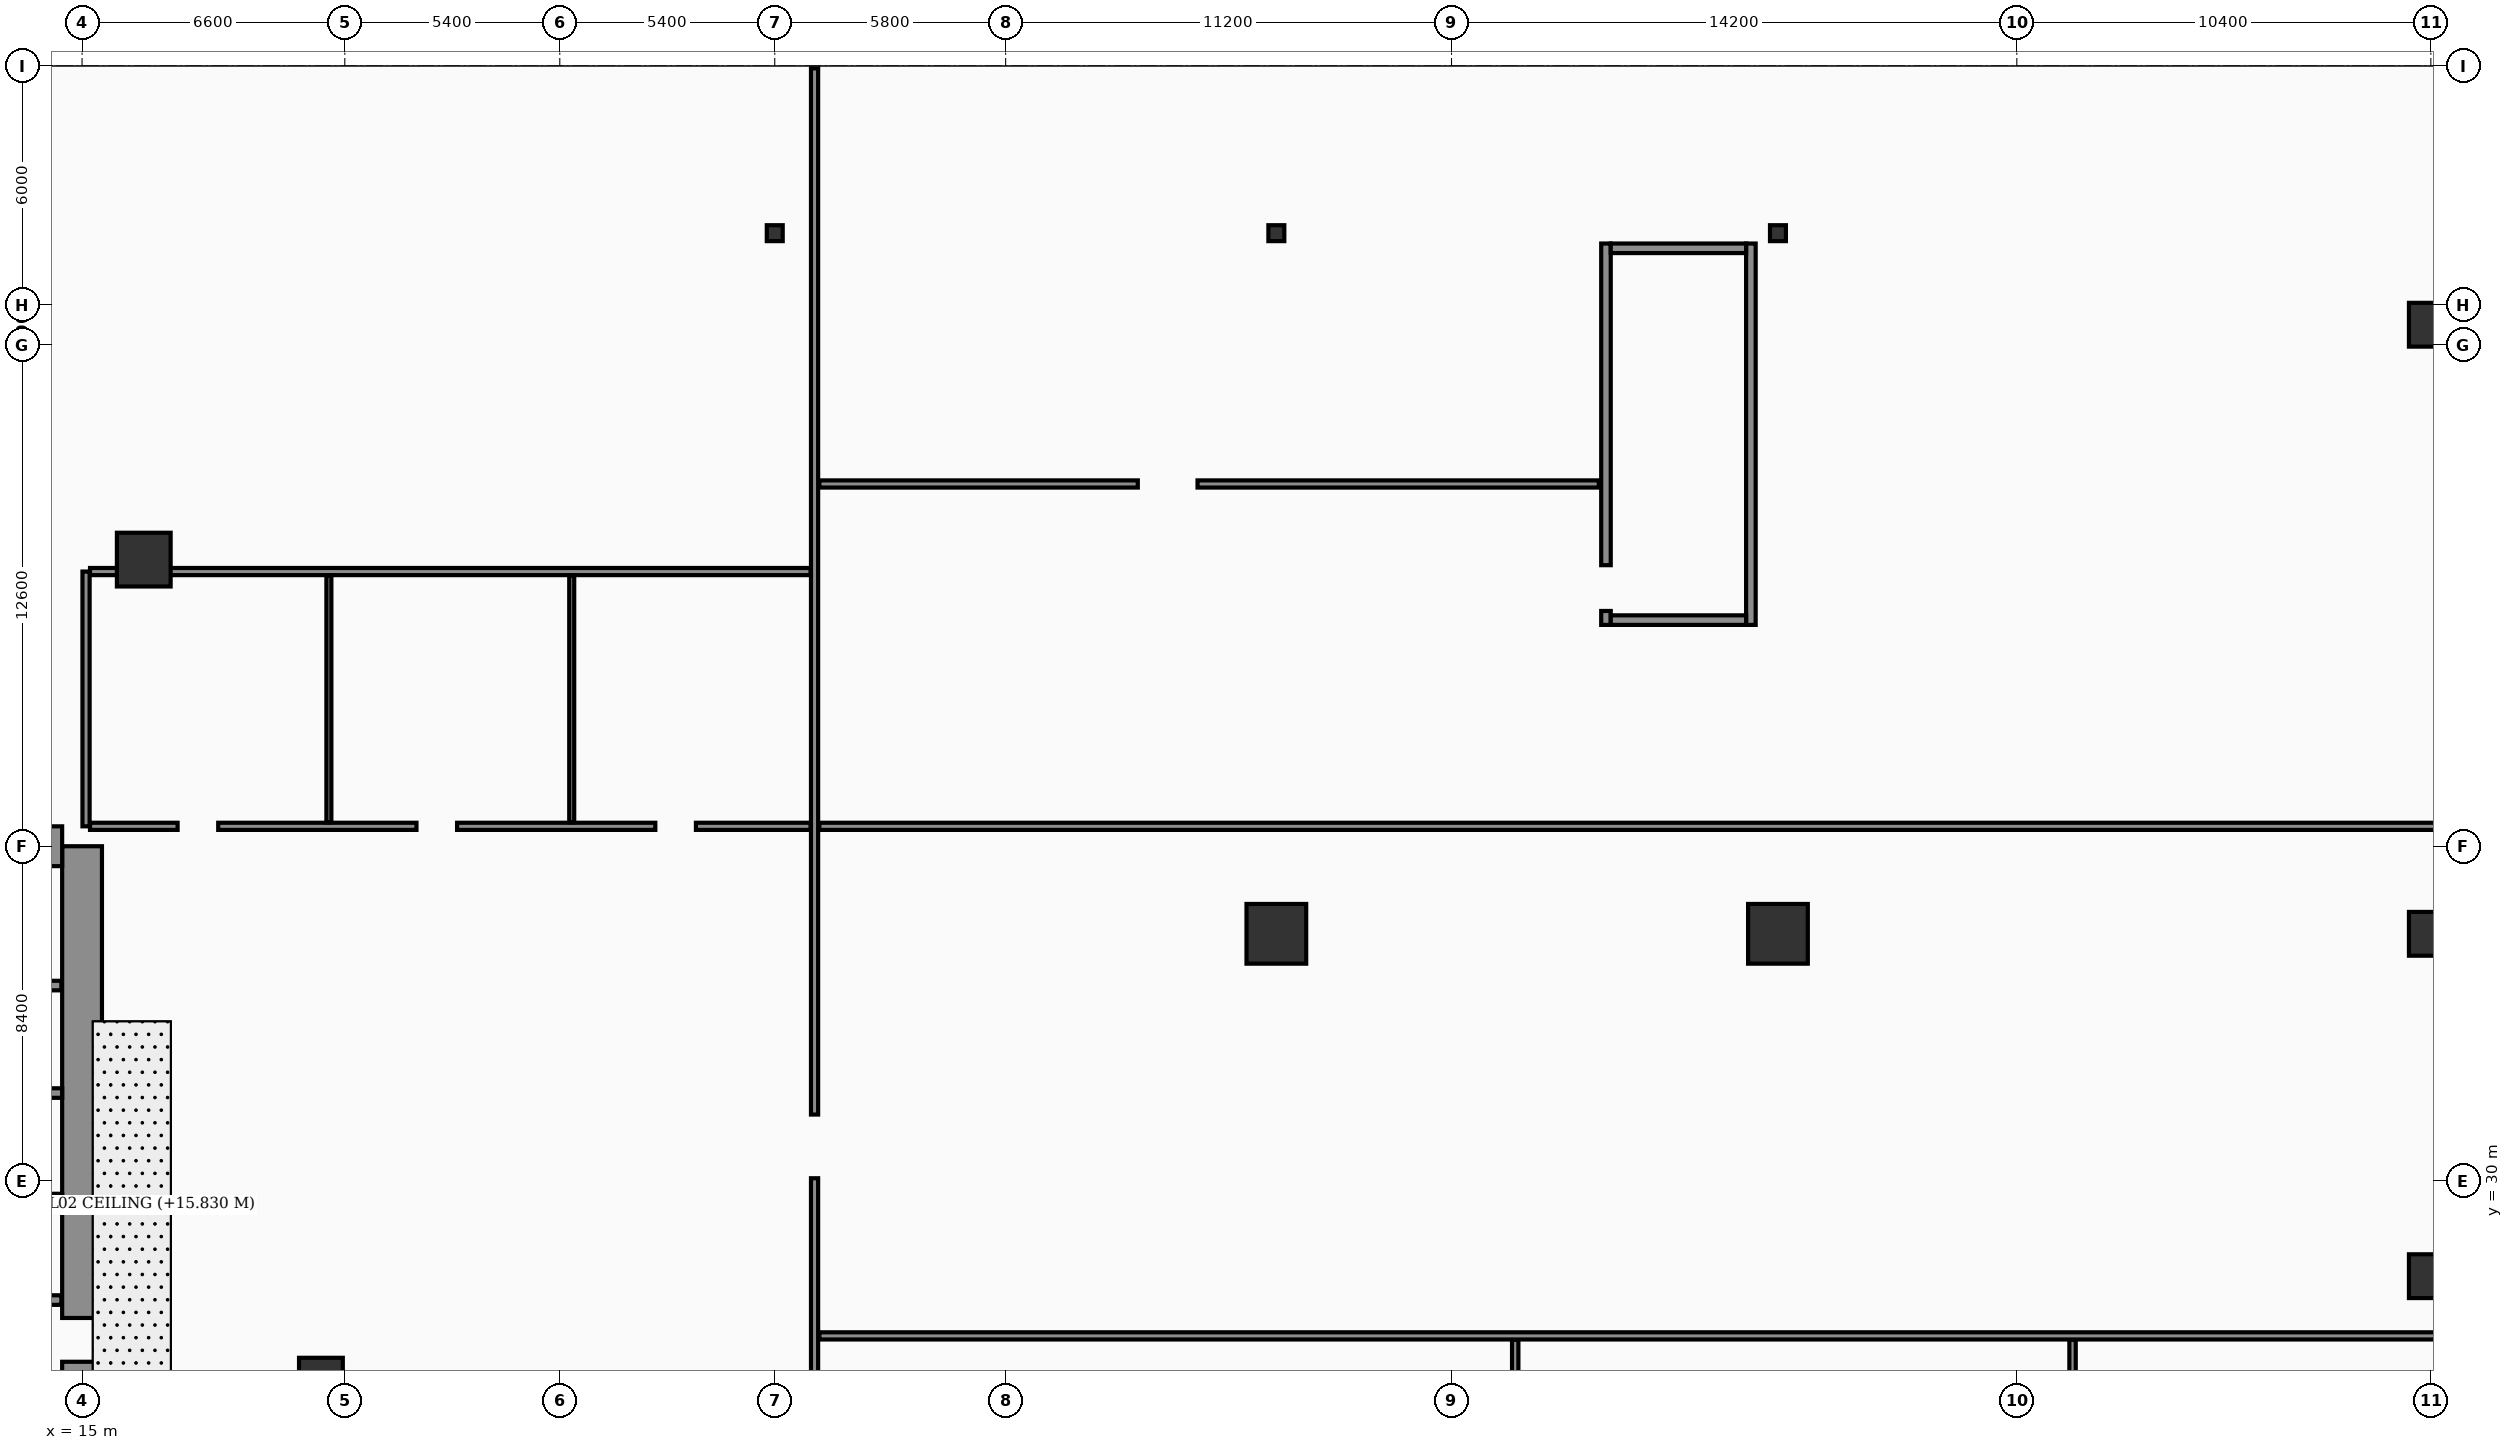
"""IFC4 building model, lengths in metres.
Left out: names, types, materials, properties, quantities, classifications, styles, units other than length and angle.
Written with IfcOpenShell. Run it as: python <this file> out.ifc"""

import sys

from ifc_helpers import new_model, si_unit, direction, frame, frame_2d, origin, origin_2d, place, context, subcontext, project, spatial, rectangle, hollow_rectangle, i_section, extrude, element, fill, save


model = new_model("IFC4")
c1 = context("Model", 3, precision=1e-05, world=origin(), true_north=direction((0.0, 1.0)))
c2 = subcontext(c1, "Body", "Model", "MODEL_VIEW")
j1 = project(units=[si_unit("LENGTHUNIT", "METRE"), si_unit("PLANEANGLEUNIT", "RADIAN")], contexts=[c1])
p1 = place(None, origin())
s1 = spatial("IfcSite", under=j1, at=p1, CompositionType="ELEMENT")
p2 = place(p1, origin())
s2 = spatial("IfcBuilding", under=s1, at=p2, CompositionType="ELEMENT")
p3 = place(p2, frame((0.0, 0.0, 12.0)))
s3 = spatial("IfcBuildingStorey", under=s2, at=p3, CompositionType="ELEMENT", Elevation=12.0)
p4 = place(p3, frame((15.0, 16.8, 0.0), z_axis=(0.0, 0.0, 1.0), x_axis=(0.0, 1.0, 0.0)))
e1 = element("IfcWall", 1, at=p4, inside=s3, PredefinedType="SHEAR", context=c2, shape_type="SweptSolid", body=[
    extrude(rectangle(XDim=21.6, YDim=1.0, at=frame_2d((10.8, 0.0))), origin(), (0.0, 0.0, 1.0), 4.68),
])
p5 = place(p4, frame((8.65, 0.0, 0.0)))
e2 = element("IfcOpeningElement", 2, at=p5, cuts=e1, PredefinedType="OPENING", context=c2, shape_type="SweptSolid", body=[
    extrude(rectangle(XDim=1.1, YDim=2.2, at=frame_2d((0.55, 1.1))), frame((0.0, 0.51, 0.0), z_axis=(0.0, -1.0, 0.0), x_axis=(1.0, 0.0, 0.0)), (0.0, 0.0, 1.0), 1.02),
])
p6 = place(p4, frame((1.25, 0.0, 0.0)))
e3 = element("IfcOpeningElement", 3, at=p6, cuts=e1, PredefinedType="OPENING", context=c2, shape_type="SweptSolid", body=[
    extrude(rectangle(XDim=1.1, YDim=2.2, at=frame_2d((0.55, 1.1))), frame((0.0, 0.51, 0.0), z_axis=(0.0, -1.0, 0.0), x_axis=(1.0, 0.0, 0.0)), (0.0, 0.0, 1.0), 1.02),
])
p7 = place(p4, frame((3.8, 0.0, 0.0)))
e4 = element("IfcOpeningElement", 4, at=p7, cuts=e1, PredefinedType="OPENING", context=c2, shape_type="SweptSolid", body=[
    extrude(rectangle(XDim=1.1, YDim=2.2, at=frame_2d((0.55, 1.1))), frame((0.0, 0.51, 0.0), z_axis=(0.0, -1.0, 0.0), x_axis=(1.0, 0.0, 0.0)), (0.0, 0.0, 1.0), 1.02),
])
p8 = place(p4, frame((6.35, 0.0, 0.0)))
e5 = element("IfcOpeningElement", 5, at=p8, cuts=e1, PredefinedType="OPENING", context=c2, shape_type="SweptSolid", body=[
    extrude(rectangle(XDim=1.1, YDim=2.2, at=frame_2d((0.55, 1.1))), frame((0.0, 0.51, 0.0), z_axis=(0.0, -1.0, 0.0), x_axis=(1.0, 0.0, 0.0)), (0.0, 0.0, 1.0), 1.02),
])
p9 = place(p3, frame((4.7, 38.4, 0.0), z_axis=(0.0, 0.0, 1.0), x_axis=(1.0, 0.0, 0.0)))
e6 = element("IfcWall", 6, at=p9, inside=s3, PredefinedType="SHEAR", context=c2, shape_type="SweptSolid", body=[
    extrude(rectangle(XDim=9.8, YDim=1.0, at=frame_2d((4.9, 0.0))), origin(), (0.0, 0.0, 1.0), 4.68),
])
p10 = place(p3, frame((53.28, 43.96, 0.0), z_axis=(0.0, 0.0, 1.0), x_axis=(0.0, 1.0, 0.0)))
e7 = element("IfcWall", 7, at=p10, inside=s3, PredefinedType="SOLIDWALL", context=c2, shape_type="SweptSolid", body=[
    extrude(rectangle(XDim=9.58, YDim=0.24, at=frame_2d((4.79, 0.0))), origin(), (0.0, 0.0, 1.0), 4.68),
])
p11 = place(p10, frame((0.35, 0.0, 0.0)))
e8 = element("IfcOpeningElement", 8, at=p11, cuts=e7, PredefinedType="OPENING", context=c2, shape_type="SweptSolid", body=[
    extrude(rectangle(XDim=1.15, YDim=2.2, at=frame_2d((0.575, 1.1))), frame((0.0, 0.13, 0.0), z_axis=(0.0, -1.0, 0.0), x_axis=(1.0, 0.0, 0.0)), (0.0, 0.0, 1.0), 0.26),
])
p12 = place(p3, frame((56.92, 43.96, 0.0), z_axis=(0.0, 0.0, 1.0), x_axis=(0.0, 1.0, 0.0)))
e9 = element("IfcWall", 9, at=p12, inside=s3, PredefinedType="SOLIDWALL", context=c2, shape_type="SweptSolid", body=[
    extrude(rectangle(XDim=9.58, YDim=0.24, at=frame_2d((4.79, 0.0))), origin(), (0.0, 0.0, 1.0), 4.68),
])
for number, where, z_axis, x_axis in (
    (10, (53.4, 44.08, 0.0), (0.0, 0.0, 1.0), (1.0, 0.0, 0.0)),
    (11, (53.4, 53.42, 0.0), (0.0, 0.0, 1.0), (1.0, 0.0, 0.0)),
):
    element("IfcWall", number, at=place(p3, frame(where, z_axis=z_axis, x_axis=x_axis)), inside=s3, PredefinedType="SOLIDWALL", context=c2, shape_type="SweptSolid", body=[
        extrude(rectangle(XDim=3.4, YDim=0.24, at=frame_2d((1.7, 0.0))), origin(), (0.0, 0.0, 1.0), 4.68),
    ])
for number, where, z_axis, x_axis in (
    (12, (12.18, 29.55, 0.0), (0.0, 0.0, 1.0), (1.0, 0.0, 0.0)),
    (13, (12.18, 32.2, 0.0), (0.0, 0.0, 1.0), (1.0, 0.0, 0.0)),
):
    element("IfcWall", number, at=place(p3, frame(where, z_axis=z_axis, x_axis=x_axis)), inside=s3, PredefinedType="SOLIDWALL", context=c2, shape_type="SweptSolid", body=[
        extrude(rectangle(XDim=2.32, YDim=0.24, at=frame_2d((1.16, 0.0))), origin(), (0.0, 0.0, 1.0), 4.68),
    ])
p13 = place(p3, frame((16.55, 45.6, 0.0), z_axis=(0.0, 0.0, 1.0), x_axis=(1.0, 0.0, 0.0)))
e14 = element("IfcColumn", 14, at=p13, inside=s3, PredefinedType="COLUMN", context=c2, shape_type="SweptSolid", body=[
    extrude(rectangle(XDim=1.35, YDim=1.35, at=origin_2d()), origin(), (0.0, 0.0, 1.0), 4.68),
])
for number, where, z_axis, x_axis in (
    (15, (21.0, 25.0, 0.0), (0.0, 0.0, 1.0), (1.0, 0.0, 0.0)),
    (16, (74.0, 27.6, 0.0), (0.0, 0.0, 1.0), (1.0, 0.0, 0.0)),
    (17, (74.0, 36.2, 0.0), (0.0, 0.0, 1.0), (1.0, 0.0, 0.0)),
    (18, (74.0, 51.5, 0.0), (0.0, 0.0, 1.0), (1.0, 0.0, 0.0)),
):
    element("IfcColumn", number, at=place(p3, frame(where, z_axis=z_axis, x_axis=x_axis)), inside=s3, PredefinedType="COLUMN", context=c2, shape_type="SweptSolid", body=[
        extrude(hollow_rectangle(XDim=1.1, YDim=1.1, WallThickness=0.045, at=origin_2d()), origin(), (0.0, 0.0, 1.0), 4.68),
    ])
for number, where, z_axis, x_axis in (
    (19, (45.0, 36.2, 0.0), (0.0, 0.0, 1.0), (1.0, 0.0, 0.0)),
    (20, (57.6, 36.2, 0.0), (0.0, 0.0, 1.0), (1.0, 0.0, 0.0)),
):
    element("IfcColumn", number, at=place(p3, frame(where, z_axis=z_axis, x_axis=x_axis)), inside=s3, PredefinedType="COLUMN", context=c2, shape_type="SweptSolid", body=[
        extrude(rectangle(XDim=1.5, YDim=1.5, at=origin_2d()), origin(), (0.0, 0.0, 1.0), 4.68),
    ])
for number, where, z_axis, x_axis in (
    (21, (32.4, 53.8, 0.0), (0.0, 0.0, 1.0), (1.0, 0.0, 0.0)),
    (22, (45.0, 53.8, 0.0), (0.0, 0.0, 1.0), (1.0, 0.0, 0.0)),
    (23, (57.6, 53.8, 0.0), (0.0, 0.0, 1.0), (1.0, 0.0, 0.0)),
):
    element("IfcColumn", number, at=place(p3, frame(where, z_axis=z_axis, x_axis=x_axis)), inside=s3, PredefinedType="PILASTER", context=c2, shape_type="SweptSolid", body=[
        extrude(i_section(OverallWidth=0.4, OverallDepth=0.4, WebThickness=0.013, FlangeThickness=0.021, FilletRadius=0.022, at=origin_2d()), origin(), (0.0, 0.0, 1.0), 4.68),
    ])
p14 = place(p3, frame((12.25, 27.0, 0.0), z_axis=(0.0, 0.0, 1.0), x_axis=(1.0, 0.0, 0.0)))
e24 = element("IfcWall", 24, at=p14, inside=s3, PredefinedType="SOLIDWALL", context=c2, shape_type="SweptSolid", body=[
    extrude(rectangle(XDim=2.23, YDim=0.24, at=frame_2d((1.115, 0.0))), origin(), (0.0, 0.0, 1.0), 4.68),
])
p15 = place(p3, frame((9.66, 34.9, 0.0), z_axis=(0.0, 0.0, 1.0), x_axis=(1.0, 0.0, 0.0)))
e25 = element("IfcWall", 25, at=p15, inside=s3, PredefinedType="SOLIDWALL", context=c2, shape_type="SweptSolid", body=[
    extrude(rectangle(XDim=4.82, YDim=0.24, at=frame_2d((2.41, 0.0))), origin(), (0.0, 0.0, 1.0), 4.68),
])
p16 = place(p3, frame((15.2, 38.9, 0.0), z_axis=(0.0, 0.0, 1.0), x_axis=(1.0, 0.0, 0.0)))
e26 = element("IfcWall", 26, at=p16, inside=s3, PredefinedType="PARTITIONING", context=c2, shape_type="SweptSolid", body=[
    extrude(rectangle(XDim=18.1, YDim=0.18, at=frame_2d((9.05, 0.0))), origin(), (0.0, 0.0, 1.0), 3.88),
])
p17 = place(p16, frame((2.2, 0.0, 0.0)))
e27 = element("IfcOpeningElement", 27, at=p17, cuts=e26, PredefinedType="OPENING", context=c2, shape_type="SweptSolid", body=[
    extrude(rectangle(XDim=1.02, YDim=2.2, at=frame_2d((0.51, 1.1))), frame((0.0, 0.1, 0.0), z_axis=(0.0, -1.0, 0.0), x_axis=(1.0, 0.0, 0.0)), (0.0, 0.0, 1.0), 0.2),
])
p18 = place(p16, frame((8.2, 0.0, 0.0)))
e28 = element("IfcOpeningElement", 28, at=p18, cuts=e26, PredefinedType="OPENING", context=c2, shape_type="SweptSolid", body=[
    extrude(rectangle(XDim=1.02, YDim=2.2, at=frame_2d((0.51, 1.1))), frame((0.0, 0.1, 0.0), z_axis=(0.0, -1.0, 0.0), x_axis=(1.0, 0.0, 0.0)), (0.0, 0.0, 1.0), 0.2),
])
p19 = place(p16, frame((14.2, 0.0, 0.0)))
e29 = element("IfcOpeningElement", 29, at=p19, cuts=e26, PredefinedType="OPENING", context=c2, shape_type="SweptSolid", body=[
    extrude(rectangle(XDim=1.02, YDim=2.2, at=frame_2d((0.51, 1.1))), frame((0.0, 0.1, 0.0), z_axis=(0.0, -1.0, 0.0), x_axis=(1.0, 0.0, 0.0)), (0.0, 0.0, 1.0), 0.2),
])
p20 = place(p3, frame((15.2, 45.3, 0.0), z_axis=(0.0, 0.0, 1.0), x_axis=(1.0, 0.0, 0.0)))
e30 = element("IfcWall", 30, at=p20, inside=s3, PredefinedType="PARTITIONING", context=c2, shape_type="SweptSolid", body=[
    extrude(rectangle(XDim=18.1, YDim=0.18, at=frame_2d((9.05, 0.0))), origin(), (0.0, 0.0, 1.0), 3.88),
])
p21 = place(p3, frame((15.1, 38.9, 0.0), z_axis=(0.0, 0.0, 1.0), x_axis=(0.0, 1.0, 0.0)))
e31 = element("IfcWall", 31, at=p21, inside=s3, PredefinedType="PARTITIONING", context=c2, shape_type="SweptSolid", body=[
    extrude(rectangle(XDim=6.4, YDim=0.18, at=frame_2d((3.2, 0.0))), origin(), (0.0, 0.0, 1.0), 3.88),
])
p22 = place(p3, frame((21.2, 39.0, 0.0), z_axis=(0.0, 0.0, 1.0), x_axis=(0.0, 1.0, 0.0)))
e32 = element("IfcWall", 32, at=p22, inside=s3, PredefinedType="PARTITIONING", context=c2, shape_type="SweptSolid", body=[
    extrude(rectangle(XDim=6.2, YDim=0.125, at=frame_2d((3.1, 0.0))), origin(), (0.0, 0.0, 1.0), 3.88),
])
p23 = place(p3, frame((27.3, 39.0, 0.0), z_axis=(0.0, 0.0, 1.0), x_axis=(0.0, 1.0, 0.0)))
e33 = element("IfcWall", 33, at=p23, inside=s3, PredefinedType="PARTITIONING", context=c2, shape_type="SweptSolid", body=[
    extrude(rectangle(XDim=6.2, YDim=0.125, at=frame_2d((3.1, 0.0))), origin(), (0.0, 0.0, 1.0), 4.68),
])
p24 = place(p3, frame((33.4, 0.06, 0.0), z_axis=(0.0, 0.0, 1.0), x_axis=(0.0, 1.0, 0.0)))
e34 = element("IfcWall", 34, at=p24, inside=s3, PredefinedType="PARTITIONING", context=c2, shape_type="SweptSolid", body=[
    extrude(rectangle(XDim=57.88, YDim=0.18, at=frame_2d((28.94, 0.0))), origin(), (0.0, 0.0, 1.0), 3.88),
])
p25 = place(p24, frame((16.5, 0.0, 0.0)))
e35 = element("IfcOpeningElement", 35, at=p25, cuts=e34, PredefinedType="OPENING", context=c2, shape_type="SweptSolid", body=[
    extrude(rectangle(XDim=1.5, YDim=2.22, at=frame_2d((0.75, 1.11))), frame((0.0, 0.1, 0.0), z_axis=(0.0, -1.0, 0.0), x_axis=(1.0, 0.0, 0.0)), (0.0, 0.0, 1.0), 0.2),
])
p26 = place(p24, frame((30.0, 0.0, 0.0)))
e36 = element("IfcOpeningElement", 36, at=p26, cuts=e34, PredefinedType="OPENING", context=c2, shape_type="SweptSolid", body=[
    extrude(rectangle(XDim=1.6, YDim=2.35, at=frame_2d((0.8, 1.175))), frame((0.0, 0.1, 0.0), z_axis=(0.0, -1.0, 0.0), x_axis=(1.0, 0.0, 0.0)), (0.0, 0.0, 1.0), 0.2),
])
p27 = place(p3, frame((51.0, 0.06, 0.0), z_axis=(0.0, 0.0, 1.0), x_axis=(0.0, 1.0, 0.0)))
e37 = element("IfcWall", 37, at=p27, inside=s3, PredefinedType="PARTITIONING", context=c2, shape_type="SweptSolid", body=[
    extrude(rectangle(XDim=25.94, YDim=0.16, at=frame_2d((12.97, 0.0))), origin(), (0.0, 0.0, 1.0), 4.18),
])
p28 = place(p27, frame((10.0, 0.0, 0.0)))
e38 = element("IfcOpeningElement", 38, at=p28, cuts=e37, PredefinedType="OPENING", context=c2, shape_type="SweptSolid", body=[
    extrude(rectangle(XDim=1.5, YDim=2.22, at=frame_2d((0.75, 1.11))), frame((0.0, 0.09, 0.0), z_axis=(0.0, -1.0, 0.0), x_axis=(1.0, 0.0, 0.0)), (0.0, 0.0, 1.0), 0.18),
])
p29 = place(p3, frame((65.0, 0.06, 0.0), z_axis=(0.0, 0.0, 1.0), x_axis=(0.0, 1.0, 0.0)))
e39 = element("IfcWall", 39, at=p29, inside=s3, PredefinedType="PARTITIONING", context=c2, shape_type="SweptSolid", body=[
    extrude(rectangle(XDim=25.94, YDim=0.16, at=frame_2d((12.97, 0.0))), origin(), (0.0, 0.0, 1.0), 4.18),
])
p30 = place(p29, frame((10.0, 0.0, 0.0)))
e40 = element("IfcOpeningElement", 40, at=p30, cuts=e39, PredefinedType="OPENING", context=c2, shape_type="SweptSolid", body=[
    extrude(rectangle(XDim=1.6, YDim=2.35, at=frame_2d((0.8, 1.175))), frame((0.0, 0.09, 0.0), z_axis=(0.0, -1.0, 0.0), x_axis=(1.0, 0.0, 0.0)), (0.0, 0.0, 1.0), 0.18),
])
p31 = place(p3, frame((33.52, 26.1, 0.0), z_axis=(0.0, 0.0, 1.0), x_axis=(1.0, 0.0, 0.0)))
e41 = element("IfcWall", 41, at=p31, inside=s3, PredefinedType="PARTITIONING", context=c2, shape_type="SweptSolid", body=[
    extrude(rectangle(XDim=50.42, YDim=0.18, at=frame_2d((25.21, 0.0))), origin(), (0.0, 0.0, 1.0), 3.18),
])
p32 = place(p3, frame((33.52, 38.9, 0.0), z_axis=(0.0, 0.0, 1.0), x_axis=(1.0, 0.0, 0.0)))
e42 = element("IfcWall", 42, at=p32, inside=s3, PredefinedType="PARTITIONING", context=c2, shape_type="SweptSolid", body=[
    extrude(rectangle(XDim=50.42, YDim=0.18, at=frame_2d((25.21, 0.0))), origin(), (0.0, 0.0, 1.0), 3.88),
])
p33 = place(p3, frame((33.52, 47.5, 0.0), z_axis=(0.0, 0.0, 1.0), x_axis=(1.0, 0.0, 0.0)))
e43 = element("IfcWall", 43, at=p33, inside=s3, PredefinedType="PARTITIONING", context=c2, shape_type="SweptSolid", body=[
    extrude(rectangle(XDim=19.58, YDim=0.18, at=frame_2d((9.79, 0.0))), origin(), (0.0, 0.0, 1.0), 3.88),
])
p34 = place(p33, frame((8.0, 0.0, 0.0)))
e44 = element("IfcOpeningElement", 44, at=p34, cuts=e43, PredefinedType="OPENING", context=c2, shape_type="SweptSolid", body=[
    extrude(rectangle(XDim=1.5, YDim=2.22, at=frame_2d((0.75, 1.11))), frame((0.0, 0.1, 0.0), z_axis=(0.0, -1.0, 0.0), x_axis=(1.0, 0.0, 0.0)), (0.0, 0.0, 1.0), 0.2),
])
p35 = place(p17, origin())
e45 = element("IfcDoor", 45, at=p35, inside=s3, OperationType="SINGLE_SWING_LEFT", PredefinedType="DOOR", context=c2, shape_type="SweptSolid", body=[
    extrude(rectangle(XDim=1.02, YDim=2.2, at=frame_2d((0.51, 1.1))), frame((0.0, 0.025, 0.0), z_axis=(0.0, -1.0, 0.0), x_axis=(1.0, 0.0, 0.0)), (0.0, 0.0, 1.0), 0.05),
])
fill(e27, e45)
p36 = place(p18, origin())
e46 = element("IfcDoor", 46, at=p36, inside=s3, OperationType="SINGLE_SWING_RIGHT", PredefinedType="DOOR", context=c2, shape_type="SweptSolid", body=[
    extrude(rectangle(XDim=1.02, YDim=2.2, at=frame_2d((0.51, 1.1))), frame((0.0, 0.025, 0.0), z_axis=(0.0, -1.0, 0.0), x_axis=(1.0, 0.0, 0.0)), (0.0, 0.0, 1.0), 0.05),
])
fill(e28, e46)
p37 = place(p19, origin())
e47 = element("IfcDoor", 47, at=p37, inside=s3, OperationType="SINGLE_SWING_LEFT", PredefinedType="DOOR", context=c2, shape_type="SweptSolid", body=[
    extrude(rectangle(XDim=1.02, YDim=2.2, at=frame_2d((0.51, 1.1))), frame((0.0, 0.025, 0.0), z_axis=(0.0, -1.0, 0.0), x_axis=(1.0, 0.0, 0.0)), (0.0, 0.0, 1.0), 0.05),
])
fill(e29, e47)
p38 = place(p26, origin())
e48 = element("IfcDoor", 48, at=p38, inside=s3, OperationType="SINGLE_SWING_RIGHT", PredefinedType="DOOR", context=c2, shape_type="SweptSolid", body=[
    extrude(rectangle(XDim=1.6, YDim=2.35, at=frame_2d((0.8, 1.175))), frame((0.0, 0.025, 0.0), z_axis=(0.0, -1.0, 0.0), x_axis=(1.0, 0.0, 0.0)), (0.0, 0.0, 1.0), 0.05),
])
fill(e36, e48)
p39 = place(p34, origin())
e49 = element("IfcDoor", 49, at=p39, inside=s3, OperationType="SINGLE_SWING_LEFT", PredefinedType="DOOR", context=c2, shape_type="SweptSolid", body=[
    extrude(rectangle(XDim=1.5, YDim=2.22, at=frame_2d((0.75, 1.11))), frame((0.0, 0.025, 0.0), z_axis=(0.0, -1.0, 0.0), x_axis=(1.0, 0.0, 0.0)), (0.0, 0.0, 1.0), 0.05),
])
fill(e44, e49)
p40 = place(p11, origin())
e50 = element("IfcDoor", 50, at=p40, inside=s3, OperationType="SINGLE_SWING_LEFT", PredefinedType="DOOR", context=c2, shape_type="SweptSolid", body=[
    extrude(rectangle(XDim=1.15, YDim=2.2, at=frame_2d((0.575, 1.1))), frame((0.0, 0.025, 0.0), z_axis=(0.0, -1.0, 0.0), x_axis=(1.0, 0.0, 0.0)), (0.0, 0.0, 1.0), 0.05),
])
fill(e8, e50)
p41 = place(p5, origin())
e51 = element("IfcDoor", 51, at=p41, inside=s3, OperationType="SINGLE_SWING_LEFT", PredefinedType="DOOR", context=c2, shape_type="SweptSolid", body=[
    extrude(rectangle(XDim=1.1, YDim=2.2, at=frame_2d((0.55, 1.1))), frame((0.0, 0.025, 0.0), z_axis=(0.0, -1.0, 0.0), x_axis=(1.0, 0.0, 0.0)), (0.0, 0.0, 1.0), 0.05),
])
fill(e2, e51)
save(model, sys.argv[1])
